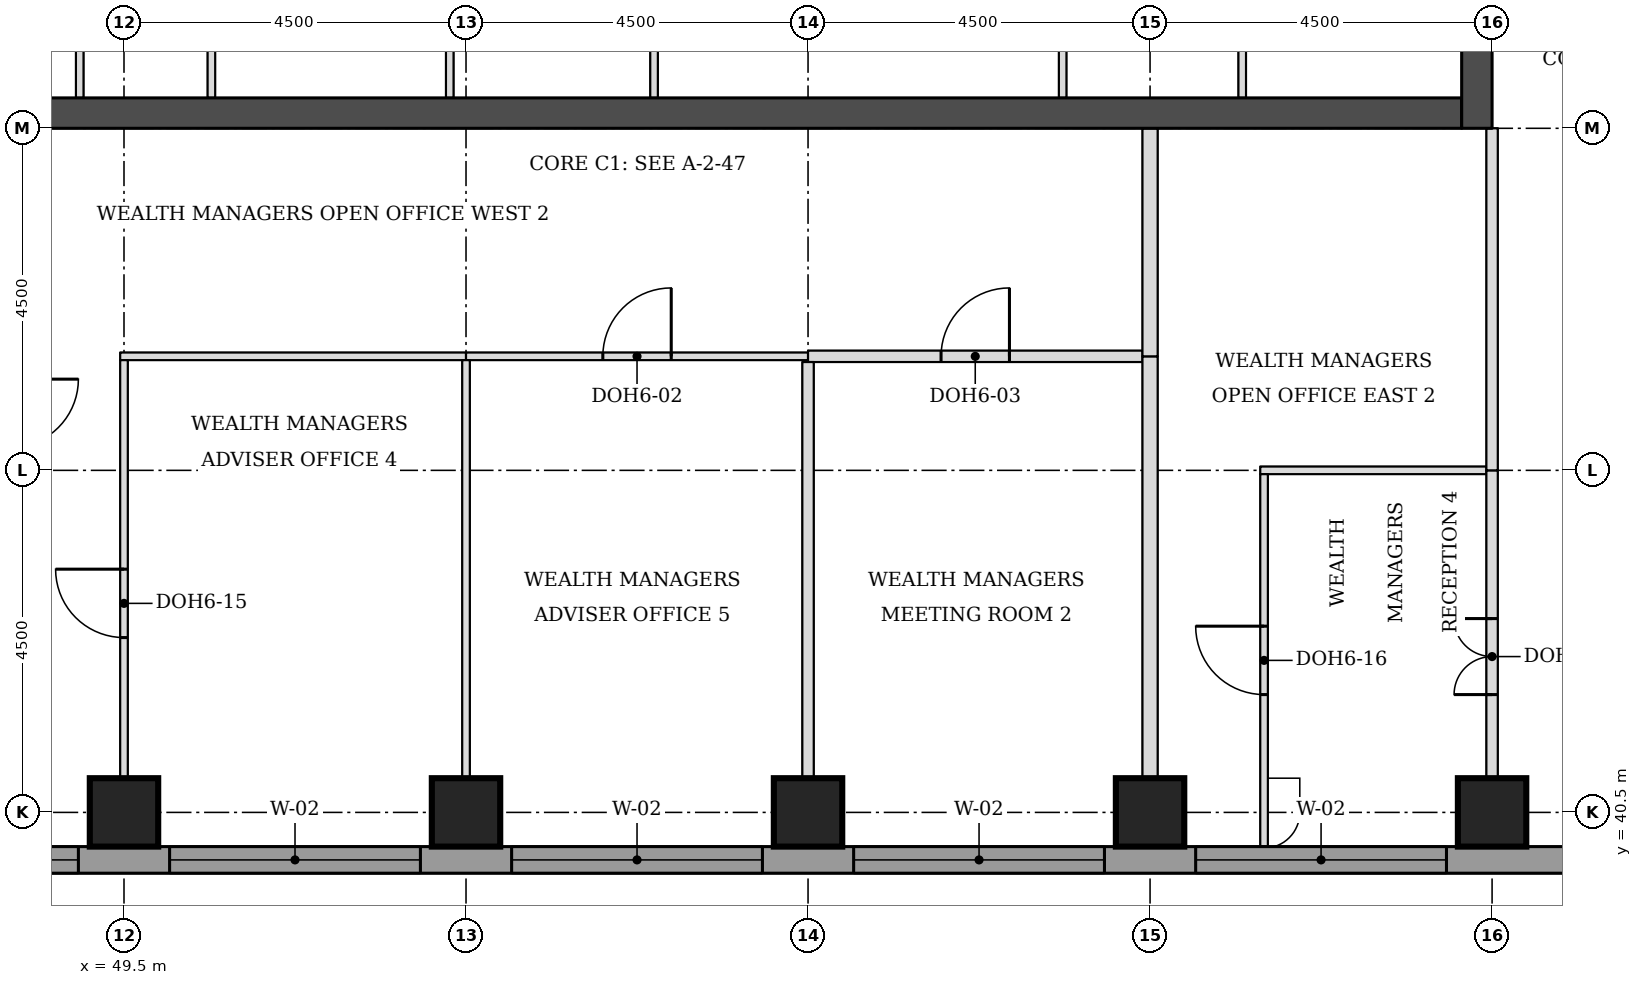
"""IFC4 building model, lengths in metres.
Left out: names, types, materials, properties, quantities, classifications, styles, units other than length and angle.
Written with IfcOpenShell. Run it as: python <this file> out.ifc"""

import sys

from ifc_helpers import new_model, si_unit, direction, frame, frame_2d, origin, origin_2d, place, context, subcontext, project, spatial, rectangle, extrude, element, fill, save


model = new_model("IFC4")
c1 = context("Model", 3, precision=1e-05, world=origin(), true_north=direction((0.0, 1.0)))
c2 = subcontext(c1, "Body", "Model", "MODEL_VIEW")
j1 = project(units=[si_unit("LENGTHUNIT", "METRE"), si_unit("PLANEANGLEUNIT", "RADIAN")], contexts=[c1])
p1 = place(None, origin())
s1 = spatial("IfcSite", under=j1, at=p1, CompositionType="ELEMENT")
p2 = place(p1, origin())
s2 = spatial("IfcBuilding", under=s1, at=p2, CompositionType="ELEMENT")
p3 = place(p2, frame((0.0, 0.0, 188.4)))
s3 = spatial("IfcBuildingStorey", under=s2, at=p3, CompositionType="ELEMENT", Elevation=188.4)
for number, where, z_axis, x_axis in (
    (1, (49.5, 40.5, 0.0), (0.0, 0.0, 1.0), (1.0, 0.0, 0.0)),
    (2, (54.0, 40.5, 0.0), (0.0, 0.0, 1.0), (1.0, 0.0, 0.0)),
    (3, (58.5, 40.5, 0.0), (0.0, 0.0, 1.0), (1.0, 0.0, 0.0)),
    (4, (63.0, 40.5, 0.0), (0.0, 0.0, 1.0), (1.0, 0.0, 0.0)),
    (5, (67.5, 40.5, 0.0), (0.0, 0.0, 1.0), (1.0, 0.0, 0.0)),
):
    element("IfcColumn", number, at=place(p3, frame(where, z_axis=z_axis, x_axis=x_axis)), inside=s3, PredefinedType="COLUMN", context=c2, shape_type="SweptSolid", body=[
        extrude(rectangle(XDim=0.9, YDim=0.9, at=origin_2d()), origin(), (0.0, 0.0, 1.0), 3.7),
    ])
p4 = place(p3, frame((45.4, 49.7, 0.0), z_axis=(0.0, 0.0, 1.0), x_axis=(1.0, 0.0, 0.0)))
e6 = element("IfcWall", 6, at=p4, inside=s3, PredefinedType="SHEAR", context=c2, shape_type="SweptSolid", body=[
    extrude(rectangle(XDim=21.7, YDim=0.4, at=frame_2d((10.85, 0.0))), origin(), (0.0, 0.0, 1.0), 3.7),
])
p5 = place(p3, frame((67.3, 49.5, 0.0), z_axis=(0.0, 0.0, 1.0), x_axis=(0.0, 1.0, 0.0)))
e7 = element("IfcWall", 7, at=p5, inside=s3, PredefinedType="SHEAR", context=c2, shape_type="SweptSolid", body=[
    extrude(rectangle(XDim=22.5, YDim=0.4, at=frame_2d((11.25, 0.0))), origin(), (0.0, 0.0, 1.0), 3.7),
])
p6 = place(p5, frame((4.2, 0.0, 0.0)))
e8 = element("IfcOpeningElement", 8, at=p6, cuts=e7, PredefinedType="OPENING", context=c2, shape_type="SweptSolid", body=[
    extrude(rectangle(XDim=1.8, YDim=2.1, at=frame_2d((0.9, 1.05))), frame((0.0, 0.21, 0.0), z_axis=(0.0, -1.0, 0.0), x_axis=(1.0, 0.0, 0.0)), (0.0, 0.0, 1.0), 0.42),
])
p7 = place(p5, frame((6.9, 0.0, 0.0)))
e9 = element("IfcOpeningElement", 9, at=p7, cuts=e7, PredefinedType="OPENING", context=c2, shape_type="SweptSolid", body=[
    extrude(rectangle(XDim=1.1, YDim=2.1, at=frame_2d((0.55, 1.05))), frame((0.0, 0.21, 0.0), z_axis=(0.0, -1.0, 0.0), x_axis=(1.0, 0.0, 0.0)), (0.0, 0.0, 1.0), 0.42),
])
p8 = place(p5, frame((13.6, 0.0, 0.0)))
e10 = element("IfcOpeningElement", 10, at=p8, cuts=e7, PredefinedType="OPENING", context=c2, shape_type="SweptSolid", body=[
    extrude(rectangle(XDim=1.1, YDim=2.1, at=frame_2d((0.55, 1.05))), frame((0.0, 0.21, 0.0), z_axis=(0.0, -1.0, 0.0), x_axis=(1.0, 0.0, 0.0)), (0.0, 0.0, 1.0), 0.42),
])
p9 = place(p5, frame((16.5, 0.0, 0.0)))
e11 = element("IfcOpeningElement", 11, at=p9, cuts=e7, PredefinedType="OPENING", context=c2, shape_type="SweptSolid", body=[
    extrude(rectangle(XDim=1.8, YDim=2.1, at=frame_2d((0.9, 1.05))), frame((0.0, 0.21, 0.0), z_axis=(0.0, -1.0, 0.0), x_axis=(1.0, 0.0, 0.0)), (0.0, 0.0, 1.0), 0.42),
])
p10 = place(p3, frame((36.0, 39.875, 0.0), z_axis=(0.0, 0.0, 1.0), x_axis=(1.0, 0.0, 0.0)))
e12 = element("IfcWall", 12, at=p10, inside=s3, PredefinedType="STANDARD", context=c2, shape_type="SweptSolid", body=[
    extrude(rectangle(XDim=36.331, YDim=0.35, at=frame_2d((18.166, 0.0))), origin(), (0.0, 0.0, 1.0), 3.525),
])
p11 = place(p10, frame((5.1, 0.0, 0.9)))
e13 = element("IfcOpeningElement", 13, at=p11, cuts=e12, PredefinedType="OPENING", context=c2, shape_type="SweptSolid", body=[
    extrude(rectangle(XDim=3.3, YDim=1.9, at=frame_2d((1.65, 0.95))), frame((0.0, 0.185, 0.0), z_axis=(0.0, -1.0, 0.0), x_axis=(1.0, 0.0, 0.0)), (0.0, 0.0, 1.0), 0.37),
])
p12 = place(p10, frame((9.6, 0.0, 0.9)))
e14 = element("IfcOpeningElement", 14, at=p12, cuts=e12, PredefinedType="OPENING", context=c2, shape_type="SweptSolid", body=[
    extrude(rectangle(XDim=3.3, YDim=1.9, at=frame_2d((1.65, 0.95))), frame((0.0, 0.185, 0.0), z_axis=(0.0, -1.0, 0.0), x_axis=(1.0, 0.0, 0.0)), (0.0, 0.0, 1.0), 0.37),
])
p13 = place(p10, frame((14.1, 0.0, 0.9)))
e15 = element("IfcOpeningElement", 15, at=p13, cuts=e12, PredefinedType="OPENING", context=c2, shape_type="SweptSolid", body=[
    extrude(rectangle(XDim=3.3, YDim=1.9, at=frame_2d((1.65, 0.95))), frame((0.0, 0.185, 0.0), z_axis=(0.0, -1.0, 0.0), x_axis=(1.0, 0.0, 0.0)), (0.0, 0.0, 1.0), 0.37),
])
p14 = place(p10, frame((18.6, 0.0, 0.9)))
e16 = element("IfcOpeningElement", 16, at=p14, cuts=e12, PredefinedType="OPENING", context=c2, shape_type="SweptSolid", body=[
    extrude(rectangle(XDim=3.3, YDim=1.9, at=frame_2d((1.65, 0.95))), frame((0.0, 0.185, 0.0), z_axis=(0.0, -1.0, 0.0), x_axis=(1.0, 0.0, 0.0)), (0.0, 0.0, 1.0), 0.37),
])
p15 = place(p10, frame((23.1, 0.0, 0.9)))
e17 = element("IfcOpeningElement", 17, at=p15, cuts=e12, PredefinedType="OPENING", context=c2, shape_type="SweptSolid", body=[
    extrude(rectangle(XDim=3.3, YDim=1.9, at=frame_2d((1.65, 0.95))), frame((0.0, 0.185, 0.0), z_axis=(0.0, -1.0, 0.0), x_axis=(1.0, 0.0, 0.0)), (0.0, 0.0, 1.0), 0.37),
])
p16 = place(p10, frame((27.6, 0.0, 0.9)))
e18 = element("IfcOpeningElement", 18, at=p16, cuts=e12, PredefinedType="OPENING", context=c2, shape_type="SweptSolid", body=[
    extrude(rectangle(XDim=3.3, YDim=1.9, at=frame_2d((1.65, 0.95))), frame((0.0, 0.185, 0.0), z_axis=(0.0, -1.0, 0.0), x_axis=(1.0, 0.0, 0.0)), (0.0, 0.0, 1.0), 0.37),
])
p17 = place(p3, frame((64.45, 45.0, 0.0), z_axis=(0.0, 0.0, 1.0), x_axis=(1.0, 0.0, 0.0)))
e19 = element("IfcWall", 19, at=p17, inside=s3, PredefinedType="PARTITIONING", context=c2, shape_type="SweptSolid", body=[
    extrude(rectangle(XDim=2.975, YDim=0.1, at=frame_2d((1.488, 0.0))), origin(), (0.0, 0.0, 1.0), 3.55),
])
p18 = place(p3, frame((49.45, 46.5, 0.0), z_axis=(0.0, 0.0, 1.0), x_axis=(1.0, 0.0, 0.0)))
e20 = element("IfcWall", 20, at=p18, inside=s3, PredefinedType="PARTITIONING", context=c2, shape_type="SweptSolid", body=[
    extrude(rectangle(XDim=4.55, YDim=0.1, at=frame_2d((2.275, 0.0))), origin(), (0.0, 0.0, 1.0), 3.55),
])
p19 = place(p3, frame((54.0, 46.5, 0.0), z_axis=(0.0, 0.0, 1.0), x_axis=(1.0, 0.0, 0.0)))
e21 = element("IfcWall", 21, at=p19, inside=s3, PredefinedType="PARTITIONING", context=c2, shape_type="SweptSolid", body=[
    extrude(rectangle(XDim=4.5, YDim=0.1, at=frame_2d((2.25, 0.0))), origin(), (0.0, 0.0, 1.0), 3.55),
])
p20 = place(p19, frame((1.8, 0.0, 0.0)))
e22 = element("IfcOpeningElement", 22, at=p20, cuts=e21, PredefinedType="OPENING", context=c2, shape_type="SweptSolid", body=[
    extrude(rectangle(XDim=0.9, YDim=2.1, at=frame_2d((0.45, 1.05))), frame((0.0, 0.06, 0.0), z_axis=(0.0, -1.0, 0.0), x_axis=(1.0, 0.0, 0.0)), (0.0, 0.0, 1.0), 0.12),
])
p21 = place(p3, frame((58.5, 46.5, 0.0), z_axis=(0.0, 0.0, 1.0), x_axis=(1.0, 0.0, 0.0)))
e23 = element("IfcWall", 23, at=p21, inside=s3, PredefinedType="PARTITIONING", context=c2, shape_type="SweptSolid", body=[
    extrude(rectangle(XDim=4.4, YDim=0.15, at=frame_2d((2.2, 0.0))), origin(), (0.0, 0.0, 1.0), 3.55),
])
p22 = place(p21, frame((1.75, 0.0, 0.0)))
e24 = element("IfcOpeningElement", 24, at=p22, cuts=e23, PredefinedType="OPENING", context=c2, shape_type="SweptSolid", body=[
    extrude(rectangle(XDim=0.9, YDim=2.1, at=frame_2d((0.45, 1.05))), frame((0.0, 0.085, 0.0), z_axis=(0.0, -1.0, 0.0), x_axis=(1.0, 0.0, 0.0)), (0.0, 0.0, 1.0), 0.17),
])
p23 = place(p3, frame((49.5, 40.05, 0.0), z_axis=(0.0, 0.0, 1.0), x_axis=(0.0, 1.0, 0.0)))
e25 = element("IfcWall", 25, at=p23, inside=s3, PredefinedType="PARTITIONING", context=c2, shape_type="SweptSolid", body=[
    extrude(rectangle(XDim=6.4, YDim=0.1, at=frame_2d((3.2, 0.0))), origin(), (0.0, 0.0, 1.0), 3.55),
])
p24 = place(p23, frame((2.75, 0.0, 0.0)))
e26 = element("IfcOpeningElement", 26, at=p24, cuts=e25, PredefinedType="OPENING", context=c2, shape_type="SweptSolid", body=[
    extrude(rectangle(XDim=0.9, YDim=2.1, at=frame_2d((0.45, 1.05))), frame((0.0, 0.06, 0.0), z_axis=(0.0, -1.0, 0.0), x_axis=(1.0, 0.0, 0.0)), (0.0, 0.0, 1.0), 0.12),
])
p25 = place(p3, frame((54.0, 40.05, 0.0), z_axis=(0.0, 0.0, 1.0), x_axis=(0.0, 1.0, 0.0)))
e27 = element("IfcWall", 27, at=p25, inside=s3, PredefinedType="PARTITIONING", context=c2, shape_type="SweptSolid", body=[
    extrude(rectangle(XDim=6.4, YDim=0.1, at=frame_2d((3.2, 0.0))), origin(), (0.0, 0.0, 1.0), 3.55),
])
p26 = place(p3, frame((58.5, 40.05, 0.0), z_axis=(0.0, 0.0, 1.0), x_axis=(0.0, 1.0, 0.0)))
e28 = element("IfcWall", 28, at=p26, inside=s3, PredefinedType="PARTITIONING", context=c2, shape_type="SweptSolid", body=[
    extrude(rectangle(XDim=6.375, YDim=0.15, at=frame_2d((3.188, 0.0))), origin(), (0.0, 0.0, 1.0), 3.55),
])
p27 = place(p3, frame((63.0, 40.05, 0.0), z_axis=(0.0, 0.0, 1.0), x_axis=(0.0, 1.0, 0.0)))
e29 = element("IfcWall", 29, at=p27, inside=s3, PredefinedType="PARTITIONING", context=c2, shape_type="SweptSolid", body=[
    extrude(rectangle(XDim=6.45, YDim=0.2, at=frame_2d((3.225, 0.0))), origin(), (0.0, 0.0, 1.0), 3.55),
])
p28 = place(p3, frame((64.5, 40.05, 0.0), z_axis=(0.0, 0.0, 1.0), x_axis=(0.0, 1.0, 0.0)))
e30 = element("IfcWall", 30, at=p28, inside=s3, PredefinedType="PARTITIONING", context=c2, shape_type="SweptSolid", body=[
    extrude(rectangle(XDim=4.9, YDim=0.1, at=frame_2d((2.45, 0.0))), origin(), (0.0, 0.0, 1.0), 3.55),
])
p29 = place(p28, frame((2.0, 0.0, 0.0)))
e31 = element("IfcOpeningElement", 31, at=p29, cuts=e30, PredefinedType="OPENING", context=c2, shape_type="SweptSolid", body=[
    extrude(rectangle(XDim=0.9, YDim=2.1, at=frame_2d((0.45, 1.05))), frame((0.0, 0.06, 0.0), z_axis=(0.0, -1.0, 0.0), x_axis=(1.0, 0.0, 0.0)), (0.0, 0.0, 1.0), 0.12),
])
p30 = place(p3, frame((67.5, 40.05, 0.0), z_axis=(0.0, 0.0, 1.0), x_axis=(0.0, 1.0, 0.0)))
e32 = element("IfcWall", 32, at=p30, inside=s3, PredefinedType="PARTITIONING", context=c2, shape_type="SweptSolid", body=[
    extrude(rectangle(XDim=4.95, YDim=0.15, at=frame_2d((2.475, 0.0))), origin(), (0.0, 0.0, 1.0), 3.022),
])
p31 = place(p30, frame((2.0, 0.0, 0.0)))
e33 = element("IfcOpeningElement", 33, at=p31, cuts=e32, PredefinedType="OPENING", context=c2, shape_type="SweptSolid", body=[
    extrude(rectangle(XDim=1.0, YDim=2.1, at=frame_2d((0.5, 1.05))), frame((0.0, 0.085, 0.0), z_axis=(0.0, -1.0, 0.0), x_axis=(1.0, 0.0, 0.0)), (0.0, 0.0, 1.0), 0.17),
])
p32 = place(p3, frame((67.5, 45.0, 0.0), z_axis=(0.0, 0.0, 1.0), x_axis=(0.0, 1.0, 0.0)))
e34 = element("IfcWall", 34, at=p32, inside=s3, PredefinedType="PARTITIONING", context=c2, shape_type="SweptSolid", body=[
    extrude(rectangle(XDim=4.5, YDim=0.15, at=frame_2d((2.25, 0.0))), origin(), (0.0, 0.0, 1.0), 3.022),
])
p33 = place(p3, frame((63.0, 46.5, 0.0), z_axis=(0.0, 0.0, 1.0), x_axis=(0.0, 1.0, 0.0)))
e35 = element("IfcWall", 35, at=p33, inside=s3, PredefinedType="PARTITIONING", context=c2, shape_type="SweptSolid", body=[
    extrude(rectangle(XDim=3.0, YDim=0.2, at=frame_2d((1.5, 0.0))), origin(), (0.0, 0.0, 1.0), 3.55),
])
for number, where, z_axis, x_axis in (
    (36, (48.917, 49.9, 0.0), (0.0, 0.0, 1.0), (0.0, 1.0, 0.0)),
    (37, (50.65, 49.9, 0.0), (0.0, 0.0, 1.0), (0.0, 1.0, 0.0)),
    (38, (53.786, 49.9, 0.0), (0.0, 0.0, 1.0), (0.0, 1.0, 0.0)),
    (39, (56.474, 49.9, 0.0), (0.0, 0.0, 1.0), (0.0, 1.0, 0.0)),
    (40, (61.85, 49.9, 0.0), (0.0, 0.0, 1.0), (0.0, 1.0, 0.0)),
    (41, (64.212, 49.9, 0.0), (0.0, 0.0, 1.0), (0.0, 1.0, 0.0)),
):
    element("IfcWall", number, at=place(p3, frame(where, z_axis=z_axis, x_axis=x_axis)), inside=s3, PredefinedType="PARTITIONING", context=c2, shape_type="SweptSolid", body=[
        extrude(rectangle(XDim=3.1, YDim=0.1, at=frame_2d((1.55, 0.0))), origin(), (0.0, 0.0, 1.0), 3.55),
    ])
p34 = place(p12, origin())
e42 = element("IfcWindow", 42, at=p34, inside=s3, PartitioningType="SINGLE_PANEL", PredefinedType="WINDOW", context=c2, shape_type="SweptSolid", body=[
    extrude(rectangle(XDim=3.3, YDim=1.9, at=frame_2d((1.65, 0.95))), frame((0.0, 0.085, 0.0), z_axis=(0.0, -1.0, 0.0), x_axis=(1.0, 0.0, 0.0)), (0.0, 0.0, 1.0), 0.06),
])
fill(e14, e42)
p35 = place(p13, origin())
e43 = element("IfcWindow", 43, at=p35, inside=s3, PartitioningType="SINGLE_PANEL", PredefinedType="WINDOW", context=c2, shape_type="SweptSolid", body=[
    extrude(rectangle(XDim=3.3, YDim=1.9, at=frame_2d((1.65, 0.95))), frame((0.0, 0.085, 0.0), z_axis=(0.0, -1.0, 0.0), x_axis=(1.0, 0.0, 0.0)), (0.0, 0.0, 1.0), 0.06),
])
fill(e15, e43)
p36 = place(p14, origin())
e44 = element("IfcWindow", 44, at=p36, inside=s3, PartitioningType="SINGLE_PANEL", PredefinedType="WINDOW", context=c2, shape_type="SweptSolid", body=[
    extrude(rectangle(XDim=3.3, YDim=1.9, at=frame_2d((1.65, 0.95))), frame((0.0, 0.085, 0.0), z_axis=(0.0, -1.0, 0.0), x_axis=(1.0, 0.0, 0.0)), (0.0, 0.0, 1.0), 0.06),
])
fill(e16, e44)
p37 = place(p15, origin())
e45 = element("IfcWindow", 45, at=p37, inside=s3, PartitioningType="SINGLE_PANEL", PredefinedType="WINDOW", context=c2, shape_type="SweptSolid", body=[
    extrude(rectangle(XDim=3.3, YDim=1.9, at=frame_2d((1.65, 0.95))), frame((0.0, 0.085, 0.0), z_axis=(0.0, -1.0, 0.0), x_axis=(1.0, 0.0, 0.0)), (0.0, 0.0, 1.0), 0.06),
])
fill(e17, e45)
p38 = place(p16, origin())
e46 = element("IfcWindow", 46, at=p38, inside=s3, PartitioningType="SINGLE_PANEL", PredefinedType="WINDOW", context=c2, shape_type="SweptSolid", body=[
    extrude(rectangle(XDim=3.3, YDim=1.9, at=frame_2d((1.65, 0.95))), frame((0.0, 0.085, 0.0), z_axis=(0.0, -1.0, 0.0), x_axis=(1.0, 0.0, 0.0)), (0.0, 0.0, 1.0), 0.06),
])
fill(e18, e46)
p39 = place(p24, origin())
e47 = element("IfcDoor", 47, at=p39, inside=s3, OperationType="SINGLE_SWING_RIGHT", PredefinedType="DOOR", context=c2, shape_type="SweptSolid", body=[
    extrude(rectangle(XDim=0.9, YDim=2.1, at=frame_2d((0.45, 1.05))), frame((0.0, 0.025, 0.0), z_axis=(0.0, -1.0, 0.0), x_axis=(1.0, 0.0, 0.0)), (0.0, 0.0, 1.0), 0.05),
])
fill(e26, e47)
p40 = place(p20, origin())
e48 = element("IfcDoor", 48, at=p40, inside=s3, OperationType="SINGLE_SWING_RIGHT", PredefinedType="DOOR", context=c2, shape_type="SweptSolid", body=[
    extrude(rectangle(XDim=0.9, YDim=2.1, at=frame_2d((0.45, 1.05))), frame((0.0, 0.025, 0.0), z_axis=(0.0, -1.0, 0.0), x_axis=(1.0, 0.0, 0.0)), (0.0, 0.0, 1.0), 0.05),
])
fill(e22, e48)
p41 = place(p22, origin())
e49 = element("IfcDoor", 49, at=p41, inside=s3, OperationType="SINGLE_SWING_RIGHT", PredefinedType="DOOR", context=c2, shape_type="SweptSolid", body=[
    extrude(rectangle(XDim=0.9, YDim=2.1, at=frame_2d((0.45, 1.05))), frame((0.0, 0.025, 0.0), z_axis=(0.0, -1.0, 0.0), x_axis=(1.0, 0.0, 0.0)), (0.0, 0.0, 1.0), 0.05),
])
fill(e24, e49)
p42 = place(p31, origin())
e50 = element("IfcDoor", 50, at=p42, inside=s3, OperationType="DOUBLE_DOOR_SINGLE_SWING", PredefinedType="DOOR", context=c2, shape_type="SweptSolid", body=[
    extrude(rectangle(XDim=1.0, YDim=2.1, at=frame_2d((0.5, 1.05))), frame((0.0, 0.025, 0.0), z_axis=(0.0, -1.0, 0.0), x_axis=(1.0, 0.0, 0.0)), (0.0, 0.0, 1.0), 0.05),
])
fill(e33, e50)
p43 = place(p29, origin())
e51 = element("IfcDoor", 51, at=p43, inside=s3, OperationType="SINGLE_SWING_RIGHT", PredefinedType="DOOR", context=c2, shape_type="SweptSolid", body=[
    extrude(rectangle(XDim=0.9, YDim=2.1, at=frame_2d((0.45, 1.05))), frame((0.0, 0.025, 0.0), z_axis=(0.0, -1.0, 0.0), x_axis=(1.0, 0.0, 0.0)), (0.0, 0.0, 1.0), 0.05),
])
fill(e31, e51)
save(model, sys.argv[1])
